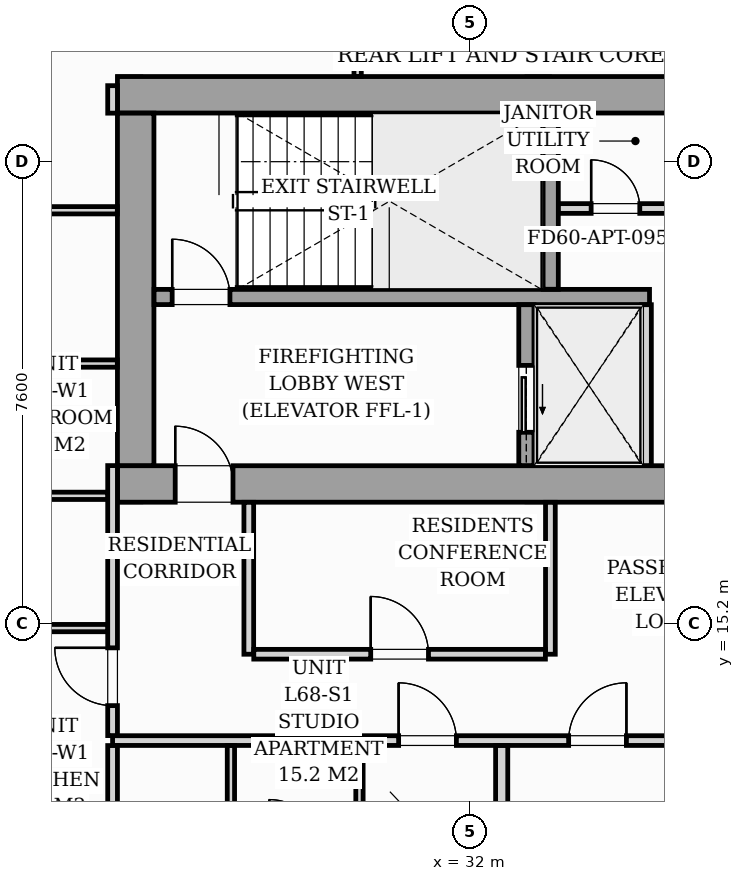
"""IFC4 building model, lengths in metres.
Left out: names, types, materials, properties, quantities, classifications, styles, units other than length and angle.
Written with IfcOpenShell. Run it as: python <this file> out.ifc"""

import sys

from ifc_helpers import new_model, si_unit, direction, frame, frame_2d, origin, origin_2d, place, context, subcontext, project, spatial, rectangle, i_section, extrude, source, transform, mapped, element, fill, save


model = new_model("IFC4")
c1 = context("Model", 3, precision=1e-05, world=origin(), true_north=direction((0.0, 1.0)))
c2 = subcontext(c1, "Body", "Model", "MODEL_VIEW")
j1 = project(units=[si_unit("LENGTHUNIT", "METRE"), si_unit("PLANEANGLEUNIT", "RADIAN")], contexts=[c1])
p1 = place(None, origin())
s1 = spatial("IfcSite", under=j1, at=p1, CompositionType="ELEMENT")
p2 = place(p1, origin())
s2 = spatial("IfcBuilding", under=s1, at=p2, CompositionType="ELEMENT")
p3 = place(p2, frame((0.0, 0.0, 236.4)))
s3 = spatial("IfcBuildingStorey", under=s2, at=p3, CompositionType="ELEMENT", Elevation=236.4)
m1 = source(origin(), c2, "Body", "SweptSolid", [
    extrude(i_section(OverallWidth=0.409, OverallDepth=0.425, WebThickness=0.033, FlangeThickness=0.052, FilletRadius=0.018, at=origin_2d()), origin(), (0.0, 0.0, 1.0), 3.296),
])
for number, where, z_axis, x_axis in (
    (1, (26.4, 17.4, 0.002), (0.0, 0.0, 1.0), (1.0, 0.0, 0.0)),
    (2, (33.12, 17.4, 0.002), (0.0, 0.0, 1.0), (1.0, 0.0, 0.0)),
    (3, (26.4, 24.0, 0.002), (0.0, 0.0, 1.0), (1.0, 0.0, 0.0)),
    (4, (33.12, 24.0, 0.002), (0.0, 0.0, 1.0), (1.0, 0.0, 0.0)),
):
    element("IfcColumn", number, at=place(p3, frame(where, z_axis=z_axis, x_axis=x_axis)), inside=s3, PredefinedType="PILASTER", context=c2, shape_type="MappedRepresentation", body=[
        mapped(m1, transform((0.0, 0.0, 0.0), scale=1.0)),
    ])
p4 = place(p3, frame((26.2, 17.5, 0.0), z_axis=(0.0, 0.0, 1.0), x_axis=(1.0, 0.0, 0.0)))
e5 = element("IfcWall", 5, at=p4, inside=s3, PredefinedType="SHEAR", context=c2, shape_type="SweptSolid", body=[
    extrude(rectangle(XDim=19.6, YDim=0.6, at=frame_2d((9.8, 0.0))), origin(), (0.0, 0.0, 1.0), 3.3),
])
p5 = place(p4, frame((0.95, 0.0, 0.0)))
e6 = element("IfcOpeningElement", 6, at=p5, cuts=e5, PredefinedType="OPENING", context=c2, shape_type="SweptSolid", body=[
    extrude(rectangle(XDim=0.95, YDim=2.06, at=frame_2d((0.475, 1.03))), frame((0.0, 0.31, 0.0), z_axis=(0.0, -1.0, 0.0), x_axis=(1.0, 0.0, 0.0)), (0.0, 0.0, 1.0), 0.62),
])
p6 = place(p4, frame((9.38, 0.0, 0.0)))
e7 = element("IfcOpeningElement", 7, at=p6, cuts=e5, PredefinedType="OPENING", context=c2, shape_type="SweptSolid", body=[
    extrude(rectangle(XDim=0.85, YDim=2.0, at=frame_2d((0.425, 1.0))), frame((0.0, 0.31, 0.0), z_axis=(0.0, -1.0, 0.0), x_axis=(1.0, 0.0, 0.0)), (0.0, 0.0, 1.0), 0.62),
])
p7 = place(p4, frame((17.55, 0.0, 0.0)))
e8 = element("IfcOpeningElement", 8, at=p7, cuts=e5, PredefinedType="OPENING", context=c2, shape_type="SweptSolid", body=[
    extrude(rectangle(XDim=0.95, YDim=2.06, at=frame_2d((0.475, 1.03))), frame((0.0, 0.31, 0.0), z_axis=(0.0, -1.0, 0.0), x_axis=(1.0, 0.0, 0.0)), (0.0, 0.0, 1.0), 0.62),
])
p8 = place(p3, frame((26.2, 23.9, 0.0), z_axis=(0.0, 0.0, 1.0), x_axis=(1.0, 0.0, 0.0)))
e9 = element("IfcWall", 9, at=p8, inside=s3, PredefinedType="SHEAR", context=c2, shape_type="SweptSolid", body=[
    extrude(rectangle(XDim=19.6, YDim=0.6, at=frame_2d((9.8, 0.0))), origin(), (0.0, 0.0, 1.0), 3.3),
])
p9 = place(p3, frame((26.5, 17.802, 0.0), z_axis=(0.0, 0.0, 1.0), x_axis=(0.0, 1.0, 0.0)))
e10 = element("IfcWall", 10, at=p9, inside=s3, PredefinedType="SHEAR", context=c2, shape_type="SweptSolid", body=[
    extrude(rectangle(XDim=5.796, YDim=0.6, at=frame_2d((2.898, 0.0))), origin(), (0.0, 0.0, 1.0), 3.3),
])
p10 = place(p3, frame((26.802, 20.575, 0.0), z_axis=(0.0, 0.0, 1.0), x_axis=(1.0, 0.0, 0.0)))
e11 = element("IfcWall", 11, at=p10, inside=s3, PredefinedType="SOLIDWALL", context=c2, shape_type="SweptSolid", body=[
    extrude(rectangle(XDim=8.148, YDim=0.25, at=frame_2d((4.074, 0.0))), origin(), (0.0, 0.0, 1.0), 3.3),
])
p11 = place(p10, frame((0.298, 0.0, 0.0)))
e12 = element("IfcOpeningElement", 12, at=p11, cuts=e11, PredefinedType="OPENING", context=c2, shape_type="SweptSolid", body=[
    extrude(rectangle(XDim=0.95, YDim=2.06, at=frame_2d((0.475, 1.03))), frame((0.0, 0.135, 0.0), z_axis=(0.0, -1.0, 0.0), x_axis=(1.0, 0.0, 0.0)), (0.0, 0.0, 1.0), 0.27),
])
p12 = place(p3, frame((33.325, 20.702, 0.0), z_axis=(0.0, 0.0, 1.0), x_axis=(0.0, 1.0, 0.0)))
e13 = element("IfcWall", 13, at=p12, inside=s3, PredefinedType="SOLIDWALL", context=c2, shape_type="SweptSolid", body=[
    extrude(rectangle(XDim=2.896, YDim=0.25, at=frame_2d((1.448, 0.0))), origin(), (0.0, 0.0, 1.0), 3.3),
])
p13 = place(p3, frame((32.925, 17.802, 0.0), z_axis=(0.0, 0.0, 1.0), x_axis=(0.0, 1.0, 0.0)))
e14 = element("IfcWall", 14, at=p13, inside=s3, PredefinedType="SOLIDWALL", context=c2, shape_type="SweptSolid", body=[
    extrude(rectangle(XDim=2.646, YDim=0.25, at=frame_2d((1.323, 0.0))), origin(), (0.0, 0.0, 1.0), 3.3),
])
p14 = place(p13, frame((0.548, 0.0, 0.0)))
e15 = element("IfcOpeningElement", 15, at=p14, cuts=e14, PredefinedType="OPENING", context=c2, shape_type="SweptSolid", body=[
    extrude(rectangle(XDim=1.1, YDim=2.08, at=frame_2d((0.55, 1.04))), frame((0.0, 0.135, 0.0), z_axis=(0.0, -1.0, 0.0), x_axis=(1.0, 0.0, 0.0)), (0.0, 0.0, 1.0), 0.27),
])
p15 = place(p3, frame((34.9, 17.802, 0.0), z_axis=(0.0, 0.0, 1.0), x_axis=(0.0, 1.0, 0.0)))
e16 = element("IfcWall", 16, at=p15, inside=s3, PredefinedType="PARTITIONING", context=c2, shape_type="SweptSolid", body=[
    extrude(rectangle(XDim=2.646, YDim=0.16, at=frame_2d((1.323, 0.0))), origin(), (0.0, 0.0, 1.0), 3.04),
])
p16 = place(p3, frame((33.452, 22.03, 0.0), z_axis=(0.0, 0.0, 1.0), x_axis=(1.0, 0.0, 0.0)))
e17 = element("IfcWall", 17, at=p16, inside=s3, PredefinedType="PARTITIONING", context=c2, shape_type="SweptSolid", body=[
    extrude(rectangle(XDim=5.096, YDim=0.16, at=frame_2d((2.548, 0.0))), origin(), (0.0, 0.0, 1.0), 3.04),
])
p17 = place(p16, frame((0.538, 0.0, 0.0)))
e18 = element("IfcOpeningElement", 18, at=p17, cuts=e17, PredefinedType="OPENING", context=c2, shape_type="SweptSolid", body=[
    extrude(rectangle(XDim=0.8, YDim=2.05, at=frame_2d((0.4, 1.025))), frame((0.0, 0.09, 0.0), z_axis=(0.0, -1.0, 0.0), x_axis=(1.0, 0.0, 0.0)), (0.0, 0.0, 1.0), 0.18),
])
p18 = place(p16, frame((3.158, 0.0, 0.0)))
e19 = element("IfcOpeningElement", 19, at=p18, cuts=e17, PredefinedType="OPENING", context=c2, shape_type="SweptSolid", body=[
    extrude(rectangle(XDim=0.8, YDim=2.05, at=frame_2d((0.4, 1.025))), frame((0.0, 0.09, 0.0), z_axis=(0.0, -1.0, 0.0), x_axis=(1.0, 0.0, 0.0)), (0.0, 0.0, 1.0), 0.18),
])
p19 = place(p3, frame((26.12, 13.28, 0.0), z_axis=(0.0, 0.0, 1.0), x_axis=(1.0, 0.0, 0.0)))
e20 = element("IfcWall", 20, at=p19, inside=s3, PredefinedType="PARTITIONING", context=c2, shape_type="SweptSolid", body=[
    extrude(rectangle(XDim=21.33, YDim=0.16, at=frame_2d((10.665, 0.0))), origin(), (0.0, 0.0, 1.0), 2.597),
])
p20 = place(p19, frame((4.704, 0.0, 0.0)))
e21 = element("IfcOpeningElement", 21, at=p20, cuts=e20, PredefinedType="OPENING", context=c2, shape_type="SweptSolid", body=[
    extrude(rectangle(XDim=0.95, YDim=2.06, at=frame_2d((0.475, 1.03))), frame((0.0, 0.09, 0.0), z_axis=(0.0, -1.0, 0.0), x_axis=(1.0, 0.0, 0.0)), (0.0, 0.0, 1.0), 0.18),
])
p21 = place(p19, frame((7.5, 0.0, 0.0)))
e22 = element("IfcOpeningElement", 22, at=p21, cuts=e20, PredefinedType="OPENING", context=c2, shape_type="SweptSolid", body=[
    extrude(rectangle(XDim=0.95, YDim=2.06, at=frame_2d((0.475, 1.03))), frame((0.0, 0.09, 0.0), z_axis=(0.0, -1.0, 0.0), x_axis=(1.0, 0.0, 0.0)), (0.0, 0.0, 1.0), 0.18),
])
p22 = place(p19, frame((14.976, 0.0, 0.0)))
e23 = element("IfcOpeningElement", 23, at=p22, cuts=e20, PredefinedType="OPENING", context=c2, shape_type="SweptSolid", body=[
    extrude(rectangle(XDim=0.95, YDim=2.06, at=frame_2d((0.475, 1.03))), frame((0.0, 0.09, 0.0), z_axis=(0.0, -1.0, 0.0), x_axis=(1.0, 0.0, 0.0)), (0.0, 0.0, 1.0), 0.18),
])
p23 = place(p3, frame((26.12, 9.751, 0.0), z_axis=(0.0, 0.0, 1.0), x_axis=(0.0, 1.0, 0.0)))
e24 = element("IfcWall", 24, at=p23, inside=s3, PredefinedType="PARTITIONING", context=c2, shape_type="SweptSolid", body=[
    extrude(rectangle(XDim=3.447, YDim=0.16, at=frame_2d((1.723, 0.0))), origin(), (0.0, 0.0, 1.0), 3.04),
])
p24 = place(p3, frame((26.12, 13.362, 0.0), z_axis=(0.0, 0.0, 1.0), x_axis=(0.0, 1.0, 0.0)))
e25 = element("IfcWall", 25, at=p24, inside=s3, PredefinedType="PARTITIONING", context=c2, shape_type="SweptSolid", body=[
    extrude(rectangle(XDim=4.44, YDim=0.16, at=frame_2d((2.22, 0.0))), origin(), (0.0, 0.0, 1.0), 3.04),
])
p25 = place(p24, frame((0.493, 0.0, 0.0)))
e26 = element("IfcOpeningElement", 26, at=p25, cuts=e25, PredefinedType="OPENING", context=c2, shape_type="SweptSolid", body=[
    extrude(rectangle(XDim=0.95, YDim=2.06, at=frame_2d((0.475, 1.03))), frame((0.0, 0.09, 0.0), z_axis=(0.0, -1.0, 0.0), x_axis=(1.0, 0.0, 0.0)), (0.0, 0.0, 1.0), 0.18),
])
p26 = place(p3, frame((26.12, 23.598, 0.0), z_axis=(0.0, 0.0, 1.0), x_axis=(0.0, 1.0, 0.0)))
e27 = element("IfcWall", 27, at=p26, inside=s3, PredefinedType="PARTITIONING", context=c2, shape_type="SweptSolid", body=[
    extrude(rectangle(XDim=0.452, YDim=0.16, at=frame_2d((0.226, 0.0))), origin(), (0.0, 0.0, 1.0), 3.04),
])
for number, where, z_axis, x_axis in (
    (28, (30.18, 11.522, 0.0), (0.0, 0.0, 1.0), (0.0, 1.0, 0.0)),
    (29, (28.066, 11.522, 0.0), (0.0, 0.0, 1.0), (0.0, 1.0, 0.0)),
):
    element("IfcWall", number, at=place(p3, frame(where, z_axis=z_axis, x_axis=x_axis)), inside=s3, PredefinedType="PARTITIONING", context=c2, shape_type="SweptSolid", body=[
        extrude(rectangle(XDim=1.676, YDim=0.12, at=frame_2d((0.838, 0.0))), origin(), (0.0, 0.0, 1.0), 3.04),
    ])
p27 = place(p3, frame((32.519, 9.169, 0.0), z_axis=(0.0, 0.0, 1.0), x_axis=(0.0, 1.0, 0.0)))
e30 = element("IfcWall", 30, at=p27, inside=s3, PredefinedType="PARTITIONING", context=c2, shape_type="SweptSolid", body=[
    extrude(rectangle(XDim=4.029, YDim=0.2, at=frame_2d((2.014, 0.0))), origin(), (0.0, 0.0, 1.0), 2.4),
])
p28 = place(p3, frame((23.782, 17.305, 0.0), z_axis=(0.0, 0.0, 1.0), x_axis=(1.0, 0.0, 0.0)))
e31 = element("IfcWall", 31, at=p28, inside=s3, PredefinedType="PARTITIONING", context=c2, shape_type="SweptSolid", body=[
    extrude(rectangle(XDim=2.256, YDim=0.12, at=frame_2d((1.128, 0.0))), origin(), (0.0, 0.0, 1.0), 2.382),
])
p29 = place(p3, frame((23.782, 15.13, 0.0), z_axis=(0.0, 0.0, 1.0), x_axis=(1.0, 0.0, 0.0)))
e32 = element("IfcWall", 32, at=p29, inside=s3, PredefinedType="PARTITIONING", context=c2, shape_type="SweptSolid", body=[
    extrude(rectangle(XDim=2.256, YDim=0.12, at=frame_2d((1.128, 0.0))), origin(), (0.0, 0.0, 1.0), 3.04),
])
p30 = place(p3, frame((23.782, 19.48, 0.0), z_axis=(0.0, 0.0, 1.0), x_axis=(1.0, 0.0, 0.0)))
e33 = element("IfcWall", 33, at=p30, inside=s3, PredefinedType="PARTITIONING", context=c2, shape_type="SweptSolid", body=[
    extrude(rectangle(XDim=2.416, YDim=0.12, at=frame_2d((1.208, 0.0))), origin(), (0.0, 0.0, 1.0), 3.04),
])
p31 = place(p3, frame((30.15, 24.202, 0.0), z_axis=(0.0, 0.0, 1.0), x_axis=(0.0, 1.0, 0.0)))
e34 = element("IfcWall", 34, at=p31, inside=s3, PredefinedType="PARTITIONING", context=c2, shape_type="SweptSolid", body=[
    extrude(rectangle(XDim=2.896, YDim=0.12, at=frame_2d((1.448, 0.0))), origin(), (0.0, 0.0, 1.0), 3.04),
])
p32 = place(p31, frame((1.128, 0.0, 0.0)))
e35 = element("IfcOpeningElement", 35, at=p32, cuts=e34, PredefinedType="OPENING", context=c2, shape_type="SweptSolid", body=[
    extrude(rectangle(XDim=0.85, YDim=2.05, at=frame_2d((0.425, 1.025))), frame((0.0, 0.07, 0.0), z_axis=(0.0, -1.0, 0.0), x_axis=(1.0, 0.0, 0.0)), (0.0, 0.0, 1.0), 0.14),
])
p33 = place(p3, frame((9.748, 22.001, 0.0), z_axis=(0.0, 0.0, 1.0), x_axis=(1.0, 0.0, 0.0)))
e36 = element("IfcWall", 36, at=p33, inside=s3, PredefinedType="PARTITIONING", context=c2, shape_type="SweptSolid", body=[
    extrude(rectangle(XDim=16.45, YDim=0.12, at=frame_2d((8.225, 0.0))), origin(), (0.0, 0.0, 1.0), 3.04),
])
p34 = place(p33, frame((9.974, 0.0, 0.0)))
e37 = element("IfcOpeningElement", 37, at=p34, cuts=e36, PredefinedType="OPENING", context=c2, shape_type="SweptSolid", body=[
    extrude(rectangle(XDim=0.85, YDim=2.05, at=frame_2d((0.425, 1.025))), frame((0.0, 0.07, 0.0), z_axis=(0.0, -1.0, 0.0), x_axis=(1.0, 0.0, 0.0)), (0.0, 0.0, 1.0), 0.14),
])
for number, where, z_axis, x_axis in (
    (38, (28.36, 14.7, 0.0), (0.0, 0.0, 1.0), (0.0, 1.0, 0.0)),
    (39, (33.32, 14.7, 0.0), (0.0, 0.0, 1.0), (0.0, 1.0, 0.0)),
):
    element("IfcWall", number, at=place(p3, frame(where, z_axis=z_axis, x_axis=x_axis)), inside=s3, PredefinedType="PARTITIONING", context=c2, shape_type="SweptSolid", body=[
        extrude(rectangle(XDim=2.498, YDim=0.16, at=frame_2d((1.249, 0.0))), origin(), (0.0, 0.0, 1.0), 3.04),
    ])
p35 = place(p3, frame((28.442, 14.7, 0.0), z_axis=(0.0, 0.0, 1.0), x_axis=(1.0, 0.0, 0.0)))
e40 = element("IfcWall", 40, at=p35, inside=s3, PredefinedType="PARTITIONING", context=c2, shape_type="SweptSolid", body=[
    extrude(rectangle(XDim=4.796, YDim=0.16, at=frame_2d((2.398, 0.0))), origin(), (0.0, 0.0, 1.0), 2.597),
])
p36 = place(p35, frame((1.923, 0.0, 0.0)))
e41 = element("IfcOpeningElement", 41, at=p36, cuts=e40, PredefinedType="OPENING", context=c2, shape_type="SweptSolid", body=[
    extrude(rectangle(XDim=0.95, YDim=2.06, at=frame_2d((0.475, 1.03))), frame((0.0, 0.09, 0.0), z_axis=(0.0, -1.0, 0.0), x_axis=(1.0, 0.0, 0.0)), (0.0, 0.0, 1.0), 0.18),
])
m2 = source(origin(), c2, "Body", "SweptSolid", [
    extrude(rectangle(XDim=0.95, YDim=2.06, at=frame_2d((0.475, 1.03))), frame((0.0, 0.025, 0.0), z_axis=(0.0, -1.0, 0.0), x_axis=(1.0, 0.0, 0.0)), (0.0, 0.0, 1.0), 0.05),
])
p37 = place(p5, origin())
e42 = element("IfcDoor", 42, at=p37, inside=s3, OperationType="SINGLE_SWING_LEFT", PredefinedType="DOOR", context=c2, shape_type="MappedRepresentation", body=[
    mapped(m2, transform((0.0, 0.0, 0.0), scale=1.0)),
])
fill(e6, e42)
p38 = place(p11, origin())
e43 = element("IfcDoor", 43, at=p38, inside=s3, OperationType="SINGLE_SWING_LEFT", PredefinedType="DOOR", context=c2, shape_type="MappedRepresentation", body=[
    mapped(m2, transform((0.0, 0.0, 0.0), scale=1.0)),
])
fill(e12, e43)
m3 = source(origin(), c2, "Body", "SweptSolid", [
    extrude(rectangle(XDim=1.1, YDim=2.08, at=frame_2d((0.55, 1.04))), frame((0.0, 0.025, 0.0), z_axis=(0.0, -1.0, 0.0), x_axis=(1.0, 0.0, 0.0)), (0.0, 0.0, 1.0), 0.05),
])
p39 = place(p14, origin())
e44 = element("IfcDoor", 44, at=p39, inside=s3, OperationType="SLIDING_TO_LEFT", PredefinedType="DOOR", context=c2, shape_type="MappedRepresentation", body=[
    mapped(m3, transform((0.0, 0.0, 0.0), scale=1.0)),
])
fill(e15, e44)
m4 = source(origin(), c2, "Body", "SweptSolid", [
    extrude(rectangle(XDim=0.8, YDim=2.05, at=frame_2d((0.4, 1.025))), frame((0.0, 0.025, 0.0), z_axis=(0.0, -1.0, 0.0), x_axis=(1.0, 0.0, 0.0)), (0.0, 0.0, 1.0), 0.05),
])
p40 = place(p17, origin())
e45 = element("IfcDoor", 45, at=p40, inside=s3, OperationType="SINGLE_SWING_LEFT", PredefinedType="DOOR", context=c2, shape_type="MappedRepresentation", body=[
    mapped(m4, transform((0.0, 0.0, 0.0), scale=1.0)),
])
fill(e18, e45)
m5 = source(origin(), c2, "Body", "SweptSolid", [
    extrude(rectangle(XDim=0.95, YDim=2.06, at=frame_2d((0.475, 1.03))), frame((0.0, 0.025, 0.0), z_axis=(0.0, -1.0, 0.0), x_axis=(1.0, 0.0, 0.0)), (0.0, 0.0, 1.0), 0.05),
])
p41 = place(p20, origin())
e46 = element("IfcDoor", 46, at=p41, inside=s3, OperationType="SINGLE_SWING_LEFT", PredefinedType="DOOR", context=c2, shape_type="MappedRepresentation", body=[
    mapped(m5, transform((0.0, 0.0, 0.0), scale=1.0)),
])
fill(e21, e46)
p42 = place(p21, origin())
e47 = element("IfcDoor", 47, at=p42, inside=s3, OperationType="SINGLE_SWING_RIGHT", PredefinedType="DOOR", context=c2, shape_type="MappedRepresentation", body=[
    mapped(m5, transform((0.0, 0.0, 0.0), scale=1.0)),
])
fill(e22, e47)
p43 = place(p25, origin())
e48 = element("IfcDoor", 48, at=p43, inside=s3, OperationType="SINGLE_SWING_RIGHT", PredefinedType="DOOR", context=c2, shape_type="MappedRepresentation", body=[
    mapped(m5, transform((0.0, 0.0, 0.0), scale=1.0)),
])
fill(e26, e48)
p44 = place(p36, origin())
e49 = element("IfcDoor", 49, at=p44, inside=s3, OperationType="SINGLE_SWING_LEFT", PredefinedType="DOOR", context=c2, shape_type="MappedRepresentation", body=[
    mapped(m5, transform((0.0, 0.0, 0.0), scale=1.0)),
])
fill(e41, e49)
save(model, sys.argv[1])
